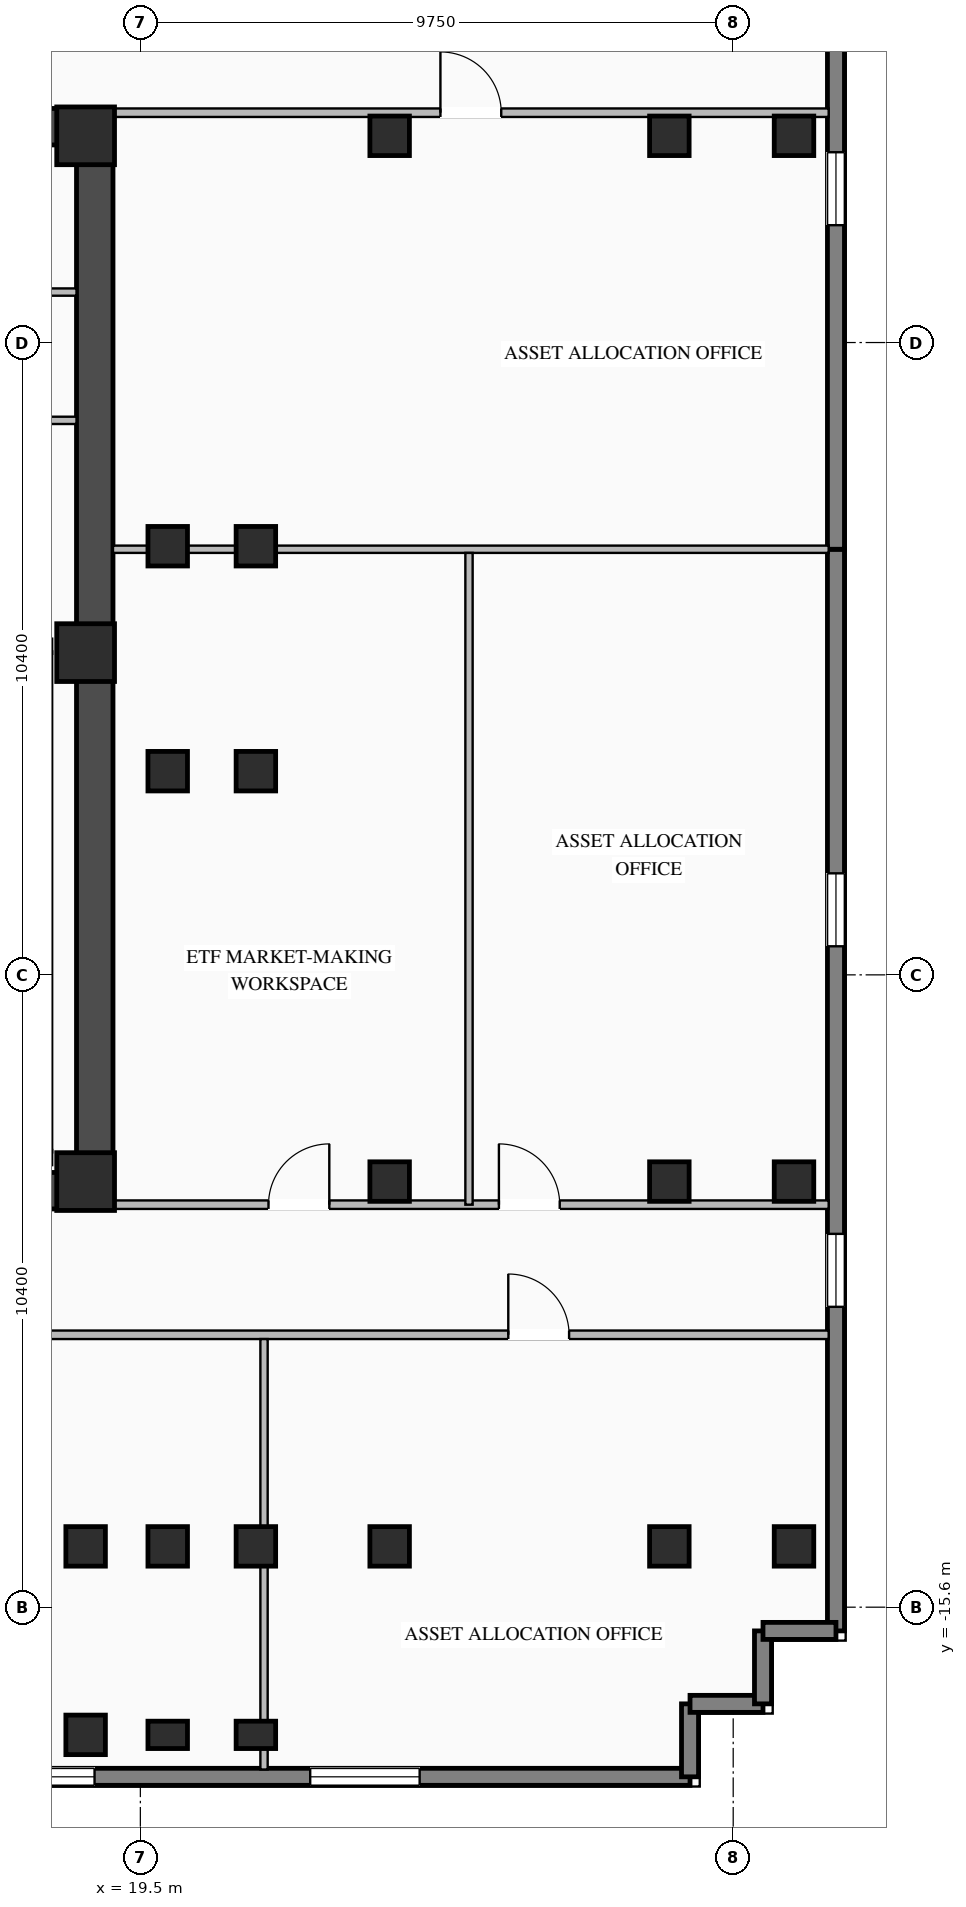
"""IFC4 building model, lengths in metres.
Left out: names, types, materials, properties, quantities, classifications, styles, units other than length and angle.
Written with IfcOpenShell. Run it as: python <this file> out.ifc"""

import sys

from ifc_helpers import new_model, si_unit, direction, frame, frame_2d, origin, origin_2d, place, context, subcontext, project, spatial, rectangle, i_section, extrude, element, fill, save


model = new_model("IFC4")
c1 = context("Model", 3, precision=1e-05, world=origin(), true_north=direction((0.0, 1.0)))
c2 = subcontext(c1, "Body", "Model", "MODEL_VIEW")
j1 = project(units=[si_unit("LENGTHUNIT", "METRE"), si_unit("PLANEANGLEUNIT", "RADIAN")], contexts=[c1])
p1 = place(None, origin())
s1 = spatial("IfcSite", under=j1, at=p1, CompositionType="ELEMENT")
p2 = place(p1, origin())
s2 = spatial("IfcBuilding", under=s1, at=p2, CompositionType="ELEMENT")
p3 = place(p2, frame((0.0, 0.0, 141.55)))
s3 = spatial("IfcBuildingStorey", under=s2, at=p3, CompositionType="ELEMENT", Elevation=141.55)
p4 = place(p3, frame((8.8, -8.75, 0.0), z_axis=(0.0, 0.0, 1.0), x_axis=(1.0, 0.0, 0.0)))
e1 = element("IfcWall", 1, at=p4, inside=s3, PredefinedType="SHEAR", context=c2, shape_type="SweptSolid", body=[
    extrude(rectangle(XDim=10.25, YDim=0.6, at=frame_2d((5.125, 0.0))), origin(), (0.0, 0.0, 1.0), 3.27),
])
p5 = place(p3, frame((8.8, 8.75, 0.0), z_axis=(0.0, 0.0, 1.0), x_axis=(1.0, 0.0, 0.0)))
e2 = element("IfcWall", 2, at=p5, inside=s3, PredefinedType="SHEAR", context=c2, shape_type="SweptSolid", body=[
    extrude(rectangle(XDim=10.25, YDim=0.6, at=frame_2d((5.125, 0.0))), origin(), (0.0, 0.0, 1.0), 3.27),
])
p6 = place(p5, frame((3.25, 0.0, 0.0)))
e3 = element("IfcOpeningElement", 3, at=p6, cuts=e2, PredefinedType="OPENING", context=c2, shape_type="SweptSolid", body=[
    extrude(rectangle(XDim=1.4, YDim=2.05, at=frame_2d((0.7, 1.025))), frame((0.0, 0.31, 0.0), z_axis=(0.0, -1.0, 0.0), x_axis=(1.0, 0.0, 0.0)), (0.0, 0.0, 1.0), 0.62),
])
p7 = place(p3, frame((18.75, -8.45, 0.0), z_axis=(0.0, 0.0, 1.0), x_axis=(0.0, 1.0, 0.0)))
e4 = element("IfcWall", 4, at=p7, inside=s3, PredefinedType="SHEAR", context=c2, shape_type="SweptSolid", body=[
    extrude(rectangle(XDim=16.9, YDim=0.6, at=frame_2d((8.45, 0.0))), origin(), (0.0, 0.0, 1.0), 3.27),
])
for number, where, z_axis, x_axis in (
    (5, (18.6, -8.6, 0.0), (0.0, 0.0, 1.0), (1.0, 0.0, 0.0)),
    (6, (18.6, 0.1, 0.0), (0.0, 0.0, 1.0), (1.0, 0.0, 0.0)),
    (7, (18.6, 8.6, 0.0), (0.0, 0.0, 1.0), (1.0, 0.0, 0.0)),
):
    element("IfcColumn", number, at=place(p3, frame(where, z_axis=z_axis, x_axis=x_axis)), inside=s3, PredefinedType="COLUMN", context=c2, shape_type="SweptSolid", body=[
        extrude(rectangle(XDim=0.95, YDim=0.95, at=origin_2d()), origin(), (0.0, 0.0, 1.0), 3.45),
    ])
for number, where, z_axis, x_axis in (
    (8, (18.6, -14.6, 0.0), (0.0, 0.0, 1.0), (1.0, 0.0, 0.0)),
    (9, (19.95, -14.6, 0.0), (0.0, 0.0, 1.0), (1.0, 0.0, 0.0)),
    (10, (21.4, -14.6, 0.0), (0.0, 0.0, 1.0), (1.0, 0.0, 0.0)),
    (11, (19.95, -1.85, 0.0), (0.0, 0.0, 1.0), (1.0, 0.0, 0.0)),
    (12, (19.95, 1.85, 0.0), (0.0, 0.0, 1.0), (1.0, 0.0, 0.0)),
    (13, (21.4, -1.85, 0.0), (0.0, 0.0, 1.0), (1.0, 0.0, 0.0)),
    (14, (21.4, 1.85, 0.0), (0.0, 0.0, 1.0), (1.0, 0.0, 0.0)),
    (15, (23.6, -14.6, 0.0), (0.0, 0.0, 1.0), (1.0, 0.0, 0.0)),
    (16, (23.6, -8.6, 0.0), (0.0, 0.0, 1.0), (1.0, 0.0, 0.0)),
    (17, (23.6, 8.6, 0.0), (0.0, 0.0, 1.0), (1.0, 0.0, 0.0)),
    (18, (28.2, -14.6, 0.0), (0.0, 0.0, 1.0), (1.0, 0.0, 0.0)),
    (19, (28.2, -8.6, 0.0), (0.0, 0.0, 1.0), (1.0, 0.0, 0.0)),
    (20, (28.2, 8.6, 0.0), (0.0, 0.0, 1.0), (1.0, 0.0, 0.0)),
    (21, (18.6, -17.7, 0.0), (0.0, 0.0, 1.0), (1.0, 0.0, 0.0)),
    (22, (30.25, -14.6, 0.0), (0.0, 0.0, 1.0), (1.0, 0.0, 0.0)),
    (23, (30.25, -8.6, 0.0), (0.0, 0.0, 1.0), (1.0, 0.0, 0.0)),
    (24, (30.25, 8.6, 0.0), (0.0, 0.0, 1.0), (1.0, 0.0, 0.0)),
):
    element("IfcColumn", number, at=place(p3, frame(where, z_axis=z_axis, x_axis=x_axis)), inside=s3, PredefinedType="COLUMN", context=c2, shape_type="SweptSolid", body=[
        extrude(i_section(OverallWidth=0.65, OverallDepth=0.65, WebThickness=0.028, FlangeThickness=0.04, at=origin_2d()), origin(), (0.0, 0.0, 1.0), 3.45),
    ])
for number, where, z_axis, x_axis in (
    (25, (19.95, -17.7, 0.0), (0.0, 0.0, 1.0), (1.0, 0.0, 0.0)),
    (26, (21.4, -17.7, 0.0), (0.0, 0.0, 1.0), (1.0, 0.0, 0.0)),
):
    element("IfcColumn", number, at=place(p3, frame(where, z_axis=z_axis, x_axis=x_axis)), inside=s3, PredefinedType="PILASTER", context=c2, shape_type="SweptSolid", body=[
        extrude(rectangle(XDim=0.65, YDim=0.45, at=origin_2d()), origin(), (0.0, 0.0, 1.0), 3.45),
    ])
p8 = place(p3, frame((28.54, -18.39, 0.0), z_axis=(0.0, 0.0, 1.0), x_axis=(-1.0, 0.0, 0.0)))
e27 = element("IfcWall", 27, at=p8, inside=s3, PredefinedType="STANDARD", context=c2, shape_type="SweptSolid", body=[
    extrude(rectangle(XDim=16.04, YDim=0.28, at=frame_2d((8.02, 0.0))), origin(), (0.0, 0.0, 1.0), 3.25),
])
p9 = place(p8, frame((4.447, 0.0, 0.76)))
e28 = element("IfcOpeningElement", 28, at=p9, cuts=e27, PredefinedType="OPENING", context=c2, shape_type="SweptSolid", body=[
    extrude(rectangle(XDim=1.8, YDim=1.95, at=frame_2d((0.9, 0.975))), frame((0.0, 0.15, 0.0), z_axis=(0.0, -1.0, 0.0), x_axis=(1.0, 0.0, 0.0)), (0.0, 0.0, 1.0), 0.3),
])
p10 = place(p8, frame((9.793, 0.0, 0.76)))
e29 = element("IfcOpeningElement", 29, at=p10, cuts=e27, PredefinedType="OPENING", context=c2, shape_type="SweptSolid", body=[
    extrude(rectangle(XDim=1.8, YDim=1.95, at=frame_2d((0.9, 0.975))), frame((0.0, 0.15, 0.0), z_axis=(0.0, -1.0, 0.0), x_axis=(1.0, 0.0, 0.0)), (0.0, 0.0, 1.0), 0.3),
])
p11 = place(p3, frame((30.94, 1.8, 0.0), z_axis=(0.0, 0.0, 1.0), x_axis=(0.0, -1.0, 0.0)))
e30 = element("IfcWall", 30, at=p11, inside=s3, PredefinedType="STANDARD", context=c2, shape_type="SweptSolid", body=[
    extrude(rectangle(XDim=17.79, YDim=0.28, at=frame_2d((8.895, 0.0))), origin(), (0.0, 0.0, 1.0), 3.25),
])
p12 = place(p11, frame((5.33, 0.0, 0.76)))
e31 = element("IfcOpeningElement", 31, at=p12, cuts=e30, PredefinedType="OPENING", context=c2, shape_type="SweptSolid", body=[
    extrude(rectangle(XDim=1.2, YDim=1.95, at=frame_2d((0.6, 0.975))), frame((0.0, 0.15, 0.0), z_axis=(0.0, -1.0, 0.0), x_axis=(1.0, 0.0, 0.0)), (0.0, 0.0, 1.0), 0.3),
])
p13 = place(p11, frame((11.26, 0.0, 0.76)))
e32 = element("IfcOpeningElement", 32, at=p13, cuts=e30, PredefinedType="OPENING", context=c2, shape_type="SweptSolid", body=[
    extrude(rectangle(XDim=1.2, YDim=1.95, at=frame_2d((0.6, 0.975))), frame((0.0, 0.15, 0.0), z_axis=(0.0, -1.0, 0.0), x_axis=(1.0, 0.0, 0.0)), (0.0, 0.0, 1.0), 0.3),
])
p14 = place(p3, frame((30.94, 19.59, 0.0), z_axis=(0.0, 0.0, 1.0), x_axis=(0.0, -1.0, 0.0)))
e33 = element("IfcWall", 33, at=p14, inside=s3, PredefinedType="STANDARD", context=c2, shape_type="SweptSolid", body=[
    extrude(rectangle(XDim=17.79, YDim=0.28, at=frame_2d((8.895, 0.0))), origin(), (0.0, 0.0, 1.0), 3.25),
])
p15 = place(p14, frame((5.33, 0.0, 0.76)))
e34 = element("IfcOpeningElement", 34, at=p15, cuts=e33, PredefinedType="OPENING", context=c2, shape_type="SweptSolid", body=[
    extrude(rectangle(XDim=1.2, YDim=1.95, at=frame_2d((0.6, 0.975))), frame((0.0, 0.15, 0.0), z_axis=(0.0, -1.0, 0.0), x_axis=(1.0, 0.0, 0.0)), (0.0, 0.0, 1.0), 0.3),
])
p16 = place(p14, frame((11.26, 0.0, 0.76)))
e35 = element("IfcOpeningElement", 35, at=p16, cuts=e33, PredefinedType="OPENING", context=c2, shape_type="SweptSolid", body=[
    extrude(rectangle(XDim=1.2, YDim=1.95, at=frame_2d((0.6, 0.975))), frame((0.0, 0.15, 0.0), z_axis=(0.0, -1.0, 0.0), x_axis=(1.0, 0.0, 0.0)), (0.0, 0.0, 1.0), 0.3),
])
for number, where, z_axis, x_axis in (
    (36, (28.54, -18.39, 0.0), (0.0, 0.0, 1.0), (0.0, 1.0, 0.0)),
    (37, (28.54, -17.19, 0.0), (0.0, 0.0, 1.0), (1.0, 0.0, 0.0)),
    (38, (29.74, -17.19, 0.0), (0.0, 0.0, 1.0), (0.0, 1.0, 0.0)),
    (39, (29.74, -15.99, 0.0), (0.0, 0.0, 1.0), (1.0, 0.0, 0.0)),
):
    element("IfcWall", number, at=place(p3, frame(where, z_axis=z_axis, x_axis=x_axis)), inside=s3, PredefinedType="STANDARD", context=c2, shape_type="SweptSolid", body=[
        extrude(rectangle(XDim=1.2, YDim=0.28, at=frame_2d((0.6, 0.0))), origin(), (0.0, 0.0, 1.0), 3.25),
    ])
p17 = place(p3, frame((13.9, 3.92, 0.0), z_axis=(0.0, 0.0, 1.0), x_axis=(1.0, 0.0, 0.0)))
e40 = element("IfcWall", 40, at=p17, inside=s3, PredefinedType="STANDARD", context=c2, shape_type="SweptSolid", body=[
    extrude(rectangle(XDim=4.55, YDim=0.12, at=frame_2d((2.275, 0.0))), origin(), (0.0, 0.0, 1.0), 3.25),
])
p18 = place(p3, frame((16.15, 6.03, 0.0), z_axis=(0.0, 0.0, 1.0), x_axis=(1.0, 0.0, 0.0)))
e41 = element("IfcWall", 41, at=p18, inside=s3, PredefinedType="STANDARD", context=c2, shape_type="SweptSolid", body=[
    extrude(rectangle(XDim=2.3, YDim=0.12, at=frame_2d((1.15, 0.0))), origin(), (0.0, 0.0, 1.0), 3.25),
])
p19 = place(p3, frame((-32.82, -11.12, 0.0), z_axis=(0.0, 0.0, 1.0), x_axis=(1.0, 0.0, 0.0)))
e42 = element("IfcWall", 42, at=p19, inside=s3, PredefinedType="STANDARD", context=c2, shape_type="SweptSolid", body=[
    extrude(rectangle(XDim=63.64, YDim=0.14, at=frame_2d((31.82, 0.0))), origin(), (0.0, 0.0, 1.0), 3.25),
])
p20 = place(p19, frame((25.91, 0.0, 0.0)))
e43 = element("IfcOpeningElement", 43, at=p20, cuts=e42, PredefinedType="OPENING", context=c2, shape_type="SweptSolid", body=[
    extrude(rectangle(XDim=0.92, YDim=2.08, at=frame_2d((0.46, 1.04))), frame((0.0, 0.08, 0.0), z_axis=(0.0, -1.0, 0.0), x_axis=(1.0, 0.0, 0.0)), (0.0, 0.0, 1.0), 0.16),
])
p21 = place(p19, frame((29.41, 0.0, 0.0)))
e44 = element("IfcOpeningElement", 44, at=p21, cuts=e42, PredefinedType="OPENING", context=c2, shape_type="SweptSolid", body=[
    extrude(rectangle(XDim=0.92, YDim=2.08, at=frame_2d((0.46, 1.04))), frame((0.0, 0.08, 0.0), z_axis=(0.0, -1.0, 0.0), x_axis=(1.0, 0.0, 0.0)), (0.0, 0.0, 1.0), 0.16),
])
p22 = place(p19, frame((32.26, 0.0, 0.0)))
e45 = element("IfcOpeningElement", 45, at=p22, cuts=e42, PredefinedType="OPENING", context=c2, shape_type="SweptSolid", body=[
    extrude(rectangle(XDim=0.92, YDim=2.08, at=frame_2d((0.46, 1.04))), frame((0.0, 0.08, 0.0), z_axis=(0.0, -1.0, 0.0), x_axis=(1.0, 0.0, 0.0)), (0.0, 0.0, 1.0), 0.16),
])
p23 = place(p19, frame((3.831, 0.0, 0.0)))
e46 = element("IfcOpeningElement", 46, at=p23, cuts=e42, PredefinedType="OPENING", context=c2, shape_type="SweptSolid", body=[
    extrude(rectangle(XDim=1.0, YDim=2.08, at=frame_2d((0.5, 1.04))), frame((0.0, 0.08, 0.0), z_axis=(0.0, -1.0, 0.0), x_axis=(1.0, 0.0, 0.0)), (0.0, 0.0, 1.0), 0.16),
])
p24 = place(p19, frame((12.208, 0.0, 0.0)))
e47 = element("IfcOpeningElement", 47, at=p24, cuts=e42, PredefinedType="OPENING", context=c2, shape_type="SweptSolid", body=[
    extrude(rectangle(XDim=1.0, YDim=2.08, at=frame_2d((0.5, 1.04))), frame((0.0, 0.08, 0.0), z_axis=(0.0, -1.0, 0.0), x_axis=(1.0, 0.0, 0.0)), (0.0, 0.0, 1.0), 0.16),
])
p25 = place(p19, frame((20.313, 0.0, 0.0)))
e48 = element("IfcOpeningElement", 48, at=p25, cuts=e42, PredefinedType="OPENING", context=c2, shape_type="SweptSolid", body=[
    extrude(rectangle(XDim=1.0, YDim=2.08, at=frame_2d((0.5, 1.04))), frame((0.0, 0.08, 0.0), z_axis=(0.0, -1.0, 0.0), x_axis=(1.0, 0.0, 0.0)), (0.0, 0.0, 1.0), 0.16),
])
p26 = place(p19, frame((38.379, 0.0, 0.0)))
e49 = element("IfcOpeningElement", 49, at=p26, cuts=e42, PredefinedType="OPENING", context=c2, shape_type="SweptSolid", body=[
    extrude(rectangle(XDim=1.0, YDim=2.08, at=frame_2d((0.5, 1.04))), frame((0.0, 0.08, 0.0), z_axis=(0.0, -1.0, 0.0), x_axis=(1.0, 0.0, 0.0)), (0.0, 0.0, 1.0), 0.16),
])
p27 = place(p19, frame((48.646, 0.0, 0.0)))
e50 = element("IfcOpeningElement", 50, at=p27, cuts=e42, PredefinedType="OPENING", context=c2, shape_type="SweptSolid", body=[
    extrude(rectangle(XDim=1.0, YDim=2.08, at=frame_2d((0.5, 1.04))), frame((0.0, 0.08, 0.0), z_axis=(0.0, -1.0, 0.0), x_axis=(1.0, 0.0, 0.0)), (0.0, 0.0, 1.0), 0.16),
])
p28 = place(p19, frame((58.371, 0.0, 0.0)))
e51 = element("IfcOpeningElement", 51, at=p28, cuts=e42, PredefinedType="OPENING", context=c2, shape_type="SweptSolid", body=[
    extrude(rectangle(XDim=1.0, YDim=2.08, at=frame_2d((0.5, 1.04))), frame((0.0, 0.08, 0.0), z_axis=(0.0, -1.0, 0.0), x_axis=(1.0, 0.0, 0.0)), (0.0, 0.0, 1.0), 0.16),
])
p29 = place(p3, frame((21.534, -18.27, 0.0), z_axis=(0.0, 0.0, 1.0), x_axis=(0.0, 1.0, 0.0)))
e52 = element("IfcWall", 52, at=p29, inside=s3, PredefinedType="STANDARD", context=c2, shape_type="SweptSolid", body=[
    extrude(rectangle(XDim=7.08, YDim=0.12, at=frame_2d((3.54, 0.0))), origin(), (0.0, 0.0, 1.0), 2.645),
])
p30 = place(p3, frame((19.05, 8.98, 0.0), z_axis=(0.0, 0.0, 1.0), x_axis=(1.0, 0.0, 0.0)))
e53 = element("IfcWall", 53, at=p30, inside=s3, PredefinedType="STANDARD", context=c2, shape_type="SweptSolid", body=[
    extrude(rectangle(XDim=11.77, YDim=0.14, at=frame_2d((5.885, 0.0))), origin(), (0.0, 0.0, 1.0), 3.25),
])
p31 = place(p30, frame((5.385, 0.0, 0.0)))
e54 = element("IfcOpeningElement", 54, at=p31, cuts=e53, PredefinedType="OPENING", context=c2, shape_type="SweptSolid", body=[
    extrude(rectangle(XDim=1.0, YDim=2.08, at=frame_2d((0.5, 1.04))), frame((0.0, 0.08, 0.0), z_axis=(0.0, -1.0, 0.0), x_axis=(1.0, 0.0, 0.0)), (0.0, 0.0, 1.0), 0.16),
])
p32 = place(p3, frame((19.05, -8.98, 0.0), z_axis=(0.0, 0.0, 1.0), x_axis=(1.0, 0.0, 0.0)))
e55 = element("IfcWall", 55, at=p32, inside=s3, PredefinedType="STANDARD", context=c2, shape_type="SweptSolid", body=[
    extrude(rectangle(XDim=11.77, YDim=0.14, at=frame_2d((5.885, 0.0))), origin(), (0.0, 0.0, 1.0), 3.25),
])
p33 = place(p32, frame((2.558, 0.0, 0.0)))
e56 = element("IfcOpeningElement", 56, at=p33, cuts=e55, PredefinedType="OPENING", context=c2, shape_type="SweptSolid", body=[
    extrude(rectangle(XDim=1.0, YDim=2.08, at=frame_2d((0.5, 1.04))), frame((0.0, 0.08, 0.0), z_axis=(0.0, -1.0, 0.0), x_axis=(1.0, 0.0, 0.0)), (0.0, 0.0, 1.0), 0.16),
])
p34 = place(p32, frame((6.347, 0.0, 0.0)))
e57 = element("IfcOpeningElement", 57, at=p34, cuts=e55, PredefinedType="OPENING", context=c2, shape_type="SweptSolid", body=[
    extrude(rectangle(XDim=1.0, YDim=2.08, at=frame_2d((0.5, 1.04))), frame((0.0, 0.08, 0.0), z_axis=(0.0, -1.0, 0.0), x_axis=(1.0, 0.0, 0.0)), (0.0, 0.0, 1.0), 0.16),
])
p35 = place(p3, frame((19.05, 1.8, 0.0), z_axis=(0.0, 0.0, 1.0), x_axis=(1.0, 0.0, 0.0)))
e58 = element("IfcWall", 58, at=p35, inside=s3, PredefinedType="STANDARD", context=c2, shape_type="SweptSolid", body=[
    extrude(rectangle(XDim=11.77, YDim=0.12, at=frame_2d((5.885, 0.0))), origin(), (0.0, 0.0, 1.0), 3.25),
])
p36 = place(p3, frame((24.905, -8.98, 0.0), z_axis=(0.0, 0.0, 1.0), x_axis=(0.0, 1.0, 0.0)))
e59 = element("IfcWall", 59, at=p36, inside=s3, PredefinedType="STANDARD", context=c2, shape_type="SweptSolid", body=[
    extrude(rectangle(XDim=10.72, YDim=0.12, at=frame_2d((5.36, 0.0))), origin(), (0.0, 0.0, 1.0), 3.25),
])
p37 = place(p9, origin())
e60 = element("IfcWindow", 60, at=p37, inside=s3, PartitioningType="SINGLE_PANEL", PredefinedType="WINDOW", context=c2, shape_type="SweptSolid", body=[
    extrude(rectangle(XDim=1.8, YDim=1.95, at=frame_2d((0.9, 0.975))), frame((0.0, 0.03, 0.0), z_axis=(0.0, -1.0, 0.0), x_axis=(1.0, 0.0, 0.0)), (0.0, 0.0, 1.0), 0.06),
])
fill(e28, e60)
p38 = place(p10, origin())
e61 = element("IfcWindow", 61, at=p38, inside=s3, PartitioningType="SINGLE_PANEL", PredefinedType="WINDOW", context=c2, shape_type="SweptSolid", body=[
    extrude(rectangle(XDim=1.8, YDim=1.95, at=frame_2d((0.9, 0.975))), frame((0.0, 0.03, 0.0), z_axis=(0.0, -1.0, 0.0), x_axis=(1.0, 0.0, 0.0)), (0.0, 0.0, 1.0), 0.06),
])
fill(e29, e61)
p39 = place(p12, origin())
e62 = element("IfcWindow", 62, at=p39, inside=s3, PartitioningType="SINGLE_PANEL", PredefinedType="WINDOW", context=c2, shape_type="SweptSolid", body=[
    extrude(rectangle(XDim=1.2, YDim=1.95, at=frame_2d((0.6, 0.975))), frame((0.0, 0.03, 0.0), z_axis=(0.0, -1.0, 0.0), x_axis=(1.0, 0.0, 0.0)), (0.0, 0.0, 1.0), 0.06),
])
fill(e31, e62)
p40 = place(p13, origin())
e63 = element("IfcWindow", 63, at=p40, inside=s3, PartitioningType="SINGLE_PANEL", PredefinedType="WINDOW", context=c2, shape_type="SweptSolid", body=[
    extrude(rectangle(XDim=1.2, YDim=1.95, at=frame_2d((0.6, 0.975))), frame((0.0, 0.03, 0.0), z_axis=(0.0, -1.0, 0.0), x_axis=(1.0, 0.0, 0.0)), (0.0, 0.0, 1.0), 0.06),
])
fill(e32, e63)
p41 = place(p16, origin())
e64 = element("IfcWindow", 64, at=p41, inside=s3, PartitioningType="SINGLE_PANEL", PredefinedType="WINDOW", context=c2, shape_type="SweptSolid", body=[
    extrude(rectangle(XDim=1.2, YDim=1.95, at=frame_2d((0.6, 0.975))), frame((0.0, 0.03, 0.0), z_axis=(0.0, -1.0, 0.0), x_axis=(1.0, 0.0, 0.0)), (0.0, 0.0, 1.0), 0.06),
])
fill(e35, e64)
p42 = place(p28, origin())
e65 = element("IfcDoor", 65, at=p42, inside=s3, OperationType="SINGLE_SWING_LEFT", PredefinedType="DOOR", context=c2, shape_type="SweptSolid", body=[
    extrude(rectangle(XDim=1.0, YDim=2.08, at=frame_2d((0.5, 1.04))), frame((0.0, 0.025, 0.0), z_axis=(0.0, -1.0, 0.0), x_axis=(1.0, 0.0, 0.0)), (0.0, 0.0, 1.0), 0.05),
])
fill(e51, e65)
p43 = place(p31, origin())
e66 = element("IfcDoor", 66, at=p43, inside=s3, OperationType="SINGLE_SWING_LEFT", PredefinedType="DOOR", context=c2, shape_type="SweptSolid", body=[
    extrude(rectangle(XDim=1.0, YDim=2.08, at=frame_2d((0.5, 1.04))), frame((0.0, 0.025, 0.0), z_axis=(0.0, -1.0, 0.0), x_axis=(1.0, 0.0, 0.0)), (0.0, 0.0, 1.0), 0.05),
])
fill(e54, e66)
p44 = place(p33, origin())
e67 = element("IfcDoor", 67, at=p44, inside=s3, OperationType="SINGLE_SWING_RIGHT", PredefinedType="DOOR", context=c2, shape_type="SweptSolid", body=[
    extrude(rectangle(XDim=1.0, YDim=2.08, at=frame_2d((0.5, 1.04))), frame((0.0, 0.025, 0.0), z_axis=(0.0, -1.0, 0.0), x_axis=(1.0, 0.0, 0.0)), (0.0, 0.0, 1.0), 0.05),
])
fill(e56, e67)
p45 = place(p34, origin())
e68 = element("IfcDoor", 68, at=p45, inside=s3, OperationType="SINGLE_SWING_LEFT", PredefinedType="DOOR", context=c2, shape_type="SweptSolid", body=[
    extrude(rectangle(XDim=1.0, YDim=2.08, at=frame_2d((0.5, 1.04))), frame((0.0, 0.025, 0.0), z_axis=(0.0, -1.0, 0.0), x_axis=(1.0, 0.0, 0.0)), (0.0, 0.0, 1.0), 0.05),
])
fill(e57, e68)
save(model, sys.argv[1])
